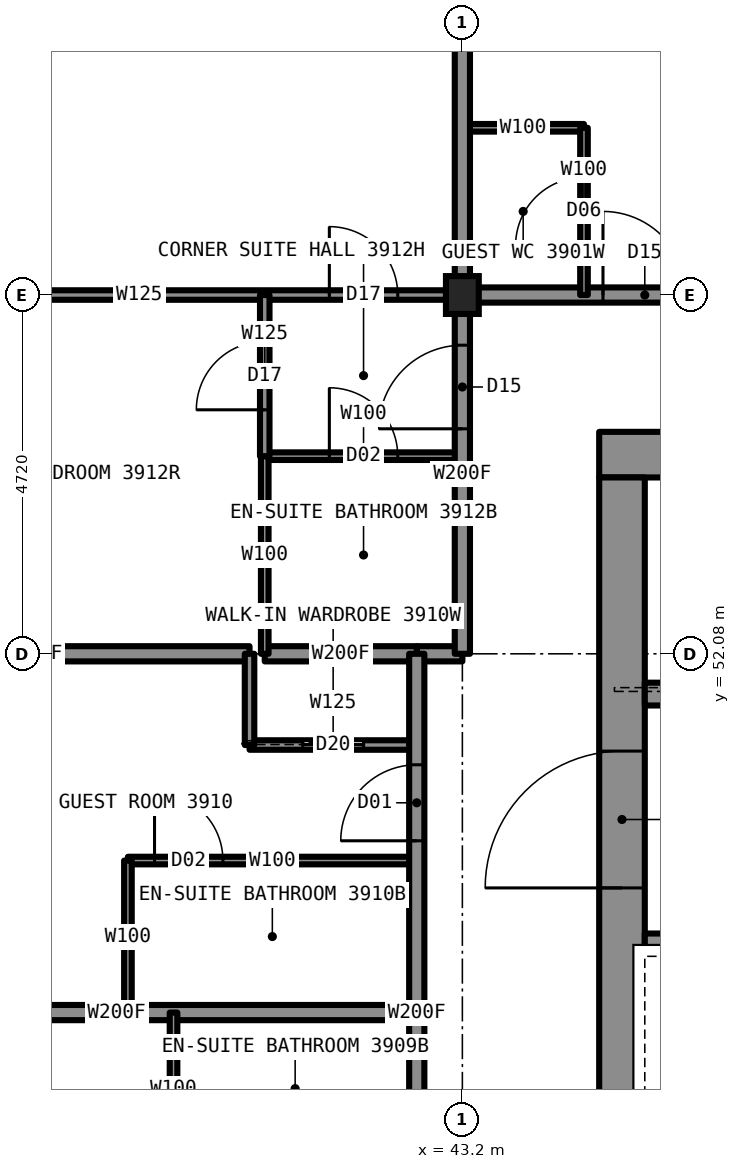
"""IFC4 building model, lengths in metres.
Left out: names, types, materials, properties, quantities, classifications, styles, units other than length and angle.
Written with IfcOpenShell. Run it as: python <this file> out.ifc"""

import sys

from ifc_helpers import new_model, si_unit, direction, frame, frame_2d, origin, origin_2d, place, context, subcontext, project, spatial, rectangle, i_section, extrude, element, fill, save


model = new_model("IFC4")
c1 = context("Model", 3, precision=1e-05, world=origin(), true_north=direction((0.0, 1.0)))
c2 = subcontext(c1, "Body", "Model", "MODEL_VIEW")
j1 = project(units=[si_unit("LENGTHUNIT", "METRE"), si_unit("PLANEANGLEUNIT", "RADIAN")], contexts=[c1])
p1 = place(None, origin())
s1 = spatial("IfcSite", under=j1, at=p1, CompositionType="ELEMENT")
p2 = place(p1, origin())
s2 = spatial("IfcBuilding", under=s1, at=p2, CompositionType="ELEMENT")
p3 = place(p2, frame((0.0, 0.0, 145.9)))
s3 = spatial("IfcBuildingStorey", under=s2, at=p3, CompositionType="ELEMENT", Elevation=145.9)
p4 = place(p3, frame((43.2, 56.8, 0.0), z_axis=(0.0, 0.0, 1.0), x_axis=(1.0, 0.0, 0.0)))
e1 = element("IfcColumn", 1, at=p4, inside=s3, PredefinedType="COLUMN", context=c2, shape_type="SweptSolid", body=[
    extrude(i_section(OverallWidth=0.432, OverallDepth=0.498, WebThickness=0.056, FlangeThickness=0.089, at=origin_2d()), origin(), (0.0, 0.0, 1.0), 3.5),
])
p5 = place(p3, frame((45.0, 54.7, 0.0), z_axis=(0.0, 0.0, 1.0), x_axis=(1.0, 0.0, 0.0)))
e2 = element("IfcWall", 2, at=p5, inside=s3, PredefinedType="SHEAR", context=c2, shape_type="SweptSolid", body=[
    extrude(rectangle(XDim=20.0, YDim=0.6, at=frame_2d((10.0, 0.0))), origin(), (0.0, 0.0, 1.0), 3.5),
])
p6 = place(p3, frame((45.3, 35.6, 0.0), z_axis=(0.0, 0.0, 1.0), x_axis=(0.0, 1.0, 0.0)))
e3 = element("IfcWall", 3, at=p6, inside=s3, PredefinedType="SHEAR", context=c2, shape_type="SweptSolid", body=[
    extrude(rectangle(XDim=18.8, YDim=0.6, at=frame_2d((9.4, 0.0))), origin(), (0.0, 0.0, 1.0), 3.5),
])
p7 = place(p6, frame((13.4, 0.0, 0.0)))
e4 = element("IfcOpeningElement", 4, at=p7, cuts=e3, PredefinedType="OPENING", context=c2, shape_type="SweptSolid", body=[
    extrude(rectangle(XDim=1.8, YDim=2.2, at=frame_2d((0.9, 1.1))), frame((0.0, 0.31, 0.0), z_axis=(0.0, -1.0, 0.0), x_axis=(1.0, 0.0, 0.0)), (0.0, 0.0, 1.0), 0.62),
])
p8 = place(p6, frame((3.6, 0.0, 0.0)))
e5 = element("IfcOpeningElement", 5, at=p8, cuts=e3, PredefinedType="OPENING", context=c2, shape_type="SweptSolid", body=[
    extrude(rectangle(XDim=1.8, YDim=2.2, at=frame_2d((0.9, 1.1))), frame((0.0, 0.31, 0.0), z_axis=(0.0, -1.0, 0.0), x_axis=(1.0, 0.0, 0.0)), (0.0, 0.0, 1.0), 0.62),
])
p9 = place(p6, frame((6.4, 0.0, 0.0)))
e6 = element("IfcOpeningElement", 6, at=p9, cuts=e3, PredefinedType="OPENING", context=c2, shape_type="SweptSolid", body=[
    extrude(rectangle(XDim=1.2, YDim=2.2, at=frame_2d((0.6, 1.1))), frame((0.0, 0.31, 0.0), z_axis=(0.0, -1.0, 0.0), x_axis=(1.0, 0.0, 0.0)), (0.0, 0.0, 1.0), 0.62),
])
p10 = place(p3, frame((45.6, 51.55, 0.0), z_axis=(0.0, 0.0, 1.0), x_axis=(1.0, 0.0, 0.0)))
e7 = element("IfcWall", 7, at=p10, inside=s3, PredefinedType="SHEAR", context=c2, shape_type="SweptSolid", body=[
    extrude(rectangle(XDim=18.8, YDim=0.3, at=frame_2d((9.4, 0.0))), origin(), (0.0, 0.0, 1.0), 3.5),
])
p11 = place(p10, frame((0.7, 0.0, 0.0)))
e8 = element("IfcOpeningElement", 8, at=p11, cuts=e7, PredefinedType="OPENING", context=c2, shape_type="SweptSolid", body=[
    extrude(rectangle(XDim=1.1, YDim=2.2, at=frame_2d((0.55, 1.1))), frame((0.0, 0.16, 0.0), z_axis=(0.0, -1.0, 0.0), x_axis=(1.0, 0.0, 0.0)), (0.0, 0.0, 1.0), 0.32),
])
p12 = place(p10, frame((3.4, 0.0, 0.0)))
e9 = element("IfcOpeningElement", 9, at=p12, cuts=e7, PredefinedType="OPENING", context=c2, shape_type="SweptSolid", body=[
    extrude(rectangle(XDim=1.1, YDim=2.2, at=frame_2d((0.55, 1.1))), frame((0.0, 0.16, 0.0), z_axis=(0.0, -1.0, 0.0), x_axis=(1.0, 0.0, 0.0)), (0.0, 0.0, 1.0), 0.32),
])
p13 = place(p10, frame((6.1, 0.0, 0.0)))
e10 = element("IfcOpeningElement", 10, at=p13, cuts=e7, PredefinedType="OPENING", context=c2, shape_type="SweptSolid", body=[
    extrude(rectangle(XDim=1.1, YDim=2.2, at=frame_2d((0.55, 1.1))), frame((0.0, 0.16, 0.0), z_axis=(0.0, -1.0, 0.0), x_axis=(1.0, 0.0, 0.0)), (0.0, 0.0, 1.0), 0.32),
])
p14 = place(p10, frame((8.8, 0.0, 0.0)))
e11 = element("IfcOpeningElement", 11, at=p14, cuts=e7, PredefinedType="OPENING", context=c2, shape_type="SweptSolid", body=[
    extrude(rectangle(XDim=1.1, YDim=2.2, at=frame_2d((0.55, 1.1))), frame((0.0, 0.16, 0.0), z_axis=(0.0, -1.0, 0.0), x_axis=(1.0, 0.0, 0.0)), (0.0, 0.0, 1.0), 0.32),
])
p15 = place(p10, frame((11.6, 0.0, 0.0)))
e12 = element("IfcOpeningElement", 12, at=p15, cuts=e7, PredefinedType="OPENING", context=c2, shape_type="SweptSolid", body=[
    extrude(rectangle(XDim=1.1, YDim=2.2, at=frame_2d((0.55, 1.1))), frame((0.0, 0.16, 0.0), z_axis=(0.0, -1.0, 0.0), x_axis=(1.0, 0.0, 0.0)), (0.0, 0.0, 1.0), 0.32),
])
p16 = place(p10, frame((14.3, 0.0, 0.0)))
e13 = element("IfcOpeningElement", 13, at=p16, cuts=e7, PredefinedType="OPENING", context=c2, shape_type="SweptSolid", body=[
    extrude(rectangle(XDim=1.1, YDim=2.2, at=frame_2d((0.55, 1.1))), frame((0.0, 0.16, 0.0), z_axis=(0.0, -1.0, 0.0), x_axis=(1.0, 0.0, 0.0)), (0.0, 0.0, 1.0), 0.32),
])
p17 = place(p3, frame((45.6, 48.25, 0.0), z_axis=(0.0, 0.0, 1.0), x_axis=(1.0, 0.0, 0.0)))
e14 = element("IfcWall", 14, at=p17, inside=s3, PredefinedType="SHEAR", context=c2, shape_type="SweptSolid", body=[
    extrude(rectangle(XDim=7.1, YDim=0.3, at=frame_2d((3.55, 0.0))), origin(), (0.0, 0.0, 1.0), 3.5),
])
p18 = place(p3, frame((43.2, 56.8, 0.0), z_axis=(0.0, 0.0, 1.0), x_axis=(1.0, 0.0, 0.0)))
e15 = element("IfcWall", 15, at=p18, inside=s3, PredefinedType="PARTITIONING", context=c2, shape_type="SweptSolid", body=[
    extrude(rectangle(XDim=23.6, YDim=0.2, at=frame_2d((11.8, 0.0))), origin(), (0.0, 0.0, 1.0), 3.33),
])
p19 = place(p18, frame((1.85, 0.0, 0.0)))
e16 = element("IfcOpeningElement", 16, at=p19, cuts=e15, PredefinedType="OPENING", context=c2, shape_type="SweptSolid", body=[
    extrude(rectangle(XDim=1.1, YDim=2.2, at=frame_2d((0.55, 1.1))), frame((0.0, 0.11, 0.0), z_axis=(0.0, -1.0, 0.0), x_axis=(1.0, 0.0, 0.0)), (0.0, 0.0, 1.0), 0.22),
])
p20 = place(p18, frame((17.16, 0.0, 0.0)))
e17 = element("IfcOpeningElement", 17, at=p20, cuts=e15, PredefinedType="OPENING", context=c2, shape_type="SweptSolid", body=[
    extrude(rectangle(XDim=1.0, YDim=2.2, at=frame_2d((0.5, 1.1))), frame((0.0, 0.11, 0.0), z_axis=(0.0, -1.0, 0.0), x_axis=(1.0, 0.0, 0.0)), (0.0, 0.0, 1.0), 0.22),
])
p21 = place(p3, frame((34.7, 56.8, 0.0), z_axis=(0.0, 0.0, 1.0), x_axis=(1.0, 0.0, 0.0)))
e18 = element("IfcWall", 18, at=p21, inside=s3, PredefinedType="PARTITIONING", context=c2, shape_type="SweptSolid", body=[
    extrude(rectangle(XDim=8.5, YDim=0.125, at=frame_2d((4.25, 0.0))), origin(), (0.0, 0.0, 1.0), 2.573),
])
p22 = place(p21, frame((6.75, 0.0, 0.0)))
e19 = element("IfcOpeningElement", 19, at=p22, cuts=e18, PredefinedType="OPENING", context=c2, shape_type="SweptSolid", body=[
    extrude(rectangle(XDim=0.9, YDim=2.2, at=frame_2d((0.45, 1.1))), frame((0.0, 0.073, 0.0), z_axis=(0.0, -1.0, 0.0), x_axis=(1.0, 0.0, 0.0)), (0.0, 0.0, 1.0), 0.145),
])
p23 = place(p3, frame((43.2, 59.0, 0.0), z_axis=(0.0, 0.0, 1.0), x_axis=(1.0, 0.0, 0.0)))
e20 = element("IfcWall", 20, at=p23, inside=s3, PredefinedType="PARTITIONING", context=c2, shape_type="SweptSolid", body=[
    extrude(rectangle(XDim=1.6, YDim=0.1, at=frame_2d((0.8, 0.0))), origin(), (0.0, 0.0, 1.0), 3.33),
])
p24 = place(p3, frame((34.7, 47.36, 0.0), z_axis=(0.0, 0.0, 1.0), x_axis=(1.0, 0.0, 0.0)))
e21 = element("IfcWall", 21, at=p24, inside=s3, PredefinedType="PARTITIONING", context=c2, shape_type="SweptSolid", body=[
    extrude(rectangle(XDim=7.9, YDim=0.2, at=frame_2d((3.95, 0.0))), origin(), (0.0, 0.0, 1.0), 2.731),
])
p25 = place(p3, frame((38.8, 49.36, 0.0), z_axis=(0.0, 0.0, 1.0), x_axis=(1.0, 0.0, 0.0)))
e22 = element("IfcWall", 22, at=p25, inside=s3, PredefinedType="PARTITIONING", context=c2, shape_type="SweptSolid", body=[
    extrude(rectangle(XDim=3.8, YDim=0.1, at=frame_2d((1.9, 0.0))), origin(), (0.0, 0.0, 1.0), 3.33),
])
p26 = place(p25, frame((0.35, 0.0, 0.0)))
e23 = element("IfcOpeningElement", 23, at=p26, cuts=e22, PredefinedType="OPENING", context=c2, shape_type="SweptSolid", body=[
    extrude(rectangle(XDim=0.9, YDim=2.1, at=frame_2d((0.45, 1.05))), frame((0.0, 0.06, 0.0), z_axis=(0.0, -1.0, 0.0), x_axis=(1.0, 0.0, 0.0)), (0.0, 0.0, 1.0), 0.12),
])
p27 = place(p3, frame((40.4, 50.88, 0.0), z_axis=(0.0, 0.0, 1.0), x_axis=(1.0, 0.0, 0.0)))
e24 = element("IfcWall", 24, at=p27, inside=s3, PredefinedType="PARTITIONING", context=c2, shape_type="SweptSolid", body=[
    extrude(rectangle(XDim=2.2, YDim=0.125, at=frame_2d((1.1, 0.0))), origin(), (0.0, 0.0, 1.0), 3.33),
])
p28 = place(p27, frame((0.7, 0.0, 0.0)))
e25 = element("IfcOpeningElement", 25, at=p28, cuts=e24, PredefinedType="OPENING", context=c2, shape_type="SweptSolid", body=[
    extrude(rectangle(XDim=0.8, YDim=2.1, at=frame_2d((0.4, 1.05))), frame((0.0, 0.073, 0.0), z_axis=(0.0, -1.0, 0.0), x_axis=(1.0, 0.0, 0.0)), (0.0, 0.0, 1.0), 0.145),
])
p29 = place(p3, frame((42.6, 52.08, 0.0), z_axis=(0.0, 0.0, 1.0), x_axis=(1.0, 0.0, 0.0)))
e26 = element("IfcWall", 26, at=p29, inside=s3, PredefinedType="PARTITIONING", context=c2, shape_type="SweptSolid", body=[
    extrude(rectangle(XDim=0.6, YDim=0.2, at=frame_2d((0.3, 0.0))), origin(), (0.0, 0.0, 1.0), 2.573),
])
p30 = place(p3, frame((34.7, 52.08, 0.0), z_axis=(0.0, 0.0, 1.0), x_axis=(1.0, 0.0, 0.0)))
e27 = element("IfcWall", 27, at=p30, inside=s3, PredefinedType="PARTITIONING", context=c2, shape_type="SweptSolid", body=[
    extrude(rectangle(XDim=5.7, YDim=0.2, at=frame_2d((2.85, 0.0))), origin(), (0.0, 0.0, 1.0), 2.573),
])
p31 = place(p3, frame((40.6, 52.08, 0.0), z_axis=(0.0, 0.0, 1.0), x_axis=(1.0, 0.0, 0.0)))
e28 = element("IfcWall", 28, at=p31, inside=s3, PredefinedType="PARTITIONING", context=c2, shape_type="SweptSolid", body=[
    extrude(rectangle(XDim=2.0, YDim=0.2, at=frame_2d((1.0, 0.0))), origin(), (0.0, 0.0, 1.0), 2.573),
])
p32 = place(p3, frame((40.6, 54.68, 0.0), z_axis=(0.0, 0.0, 1.0), x_axis=(1.0, 0.0, 0.0)))
e29 = element("IfcWall", 29, at=p32, inside=s3, PredefinedType="PARTITIONING", context=c2, shape_type="SweptSolid", body=[
    extrude(rectangle(XDim=2.6, YDim=0.1, at=frame_2d((1.3, 0.0))), origin(), (0.0, 0.0, 1.0), 3.33),
])
p33 = place(p32, frame((0.85, 0.0, 0.0)))
e30 = element("IfcOpeningElement", 30, at=p33, cuts=e29, PredefinedType="OPENING", context=c2, shape_type="SweptSolid", body=[
    extrude(rectangle(XDim=0.9, YDim=2.1, at=frame_2d((0.45, 1.05))), frame((0.0, 0.06, 0.0), z_axis=(0.0, -1.0, 0.0), x_axis=(1.0, 0.0, 0.0)), (0.0, 0.0, 1.0), 0.12),
])
p34 = place(p3, frame((44.8, 56.8, 0.0), z_axis=(0.0, 0.0, 1.0), x_axis=(0.0, 1.0, 0.0)))
e31 = element("IfcWall", 31, at=p34, inside=s3, PredefinedType="PARTITIONING", context=c2, shape_type="SweptSolid", body=[
    extrude(rectangle(XDim=2.2, YDim=0.1, at=frame_2d((1.1, 0.0))), origin(), (0.0, 0.0, 1.0), 3.33),
])
p35 = place(p34, frame((0.65, 0.0, 0.0)))
e32 = element("IfcOpeningElement", 32, at=p35, cuts=e31, PredefinedType="OPENING", context=c2, shape_type="SweptSolid", body=[
    extrude(rectangle(XDim=0.9, YDim=2.1, at=frame_2d((0.45, 1.05))), frame((0.0, 0.06, 0.0), z_axis=(0.0, -1.0, 0.0), x_axis=(1.0, 0.0, 0.0)), (0.0, 0.0, 1.0), 0.12),
])
p36 = place(p3, frame((43.2, 52.08, 0.0), z_axis=(0.0, 0.0, 1.0), x_axis=(0.0, 1.0, 0.0)))
e33 = element("IfcWall", 33, at=p36, inside=s3, PredefinedType="PARTITIONING", context=c2, shape_type="SweptSolid", body=[
    extrude(rectangle(XDim=4.72, YDim=0.2, at=frame_2d((2.36, 0.0))), origin(), (0.0, 0.0, 1.0), 3.33),
])
p37 = place(p36, frame((2.96, 0.0, 0.0)))
e34 = element("IfcOpeningElement", 34, at=p37, cuts=e33, PredefinedType="OPENING", context=c2, shape_type="SweptSolid", body=[
    extrude(rectangle(XDim=1.1, YDim=2.2, at=frame_2d((0.55, 1.1))), frame((0.0, 0.11, 0.0), z_axis=(0.0, -1.0, 0.0), x_axis=(1.0, 0.0, 0.0)), (0.0, 0.0, 1.0), 0.22),
])
p38 = place(p3, frame((43.2, 56.8, 0.0), z_axis=(0.0, 0.0, 1.0), x_axis=(0.0, 1.0, 0.0)))
e35 = element("IfcWall", 35, at=p38, inside=s3, PredefinedType="PARTITIONING", context=c2, shape_type="SweptSolid", body=[
    extrude(rectangle(XDim=8.5, YDim=0.2, at=frame_2d((4.25, 0.0))), origin(), (0.0, 0.0, 1.0), 2.573),
])
p39 = place(p3, frame((42.6, 37.92, 0.0), z_axis=(0.0, 0.0, 1.0), x_axis=(0.0, 1.0, 0.0)))
e36 = element("IfcWall", 36, at=p39, inside=s3, PredefinedType="PARTITIONING", context=c2, shape_type="SweptSolid", body=[
    extrude(rectangle(XDim=14.16, YDim=0.2, at=frame_2d((7.08, 0.0))), origin(), (0.0, 0.0, 1.0), 3.33),
])
p40 = place(p39, frame((1.46, 0.0, 0.0)))
e37 = element("IfcOpeningElement", 37, at=p40, cuts=e36, PredefinedType="OPENING", context=c2, shape_type="SweptSolid", body=[
    extrude(rectangle(XDim=1.0, YDim=2.2, at=frame_2d((0.5, 1.1))), frame((0.0, 0.11, 0.0), z_axis=(0.0, -1.0, 0.0), x_axis=(1.0, 0.0, 0.0)), (0.0, 0.0, 1.0), 0.22),
])
p41 = place(p39, frame((6.18, 0.0, 0.0)))
e38 = element("IfcOpeningElement", 38, at=p41, cuts=e36, PredefinedType="OPENING", context=c2, shape_type="SweptSolid", body=[
    extrude(rectangle(XDim=1.0, YDim=2.2, at=frame_2d((0.5, 1.1))), frame((0.0, 0.11, 0.0), z_axis=(0.0, -1.0, 0.0), x_axis=(1.0, 0.0, 0.0)), (0.0, 0.0, 1.0), 0.22),
])
p42 = place(p39, frame((11.7, 0.0, 0.0)))
e39 = element("IfcOpeningElement", 39, at=p42, cuts=e36, PredefinedType="OPENING", context=c2, shape_type="SweptSolid", body=[
    extrude(rectangle(XDim=1.0, YDim=2.2, at=frame_2d((0.5, 1.1))), frame((0.0, 0.11, 0.0), z_axis=(0.0, -1.0, 0.0), x_axis=(1.0, 0.0, 0.0)), (0.0, 0.0, 1.0), 0.22),
])
p43 = place(p3, frame((40.6, 52.08, 0.0), z_axis=(0.0, 0.0, 1.0), x_axis=(0.0, 1.0, 0.0)))
e40 = element("IfcWall", 40, at=p43, inside=s3, PredefinedType="PARTITIONING", context=c2, shape_type="SweptSolid", body=[
    extrude(rectangle(XDim=2.6, YDim=0.1, at=frame_2d((1.3, 0.0))), origin(), (0.0, 0.0, 1.0), 3.33),
])
p44 = place(p3, frame((40.6, 54.68, 0.0), z_axis=(0.0, 0.0, 1.0), x_axis=(0.0, 1.0, 0.0)))
e41 = element("IfcWall", 41, at=p44, inside=s3, PredefinedType="PARTITIONING", context=c2, shape_type="SweptSolid", body=[
    extrude(rectangle(XDim=2.12, YDim=0.125, at=frame_2d((1.06, 0.0))), origin(), (0.0, 0.0, 1.0), 3.33),
])
p45 = place(p44, frame((0.61, 0.0, 0.0)))
e42 = element("IfcOpeningElement", 42, at=p45, cuts=e41, PredefinedType="OPENING", context=c2, shape_type="SweptSolid", body=[
    extrude(rectangle(XDim=0.9, YDim=2.2, at=frame_2d((0.45, 1.1))), frame((0.0, 0.073, 0.0), z_axis=(0.0, -1.0, 0.0), x_axis=(1.0, 0.0, 0.0)), (0.0, 0.0, 1.0), 0.145),
])
p46 = place(p3, frame((40.4, 50.88, 0.0), z_axis=(0.0, 0.0, 1.0), x_axis=(0.0, 1.0, 0.0)))
e43 = element("IfcWall", 43, at=p46, inside=s3, PredefinedType="PARTITIONING", context=c2, shape_type="SweptSolid", body=[
    extrude(rectangle(XDim=1.2, YDim=0.125, at=frame_2d((0.6, 0.0))), origin(), (0.0, 0.0, 1.0), 3.33),
])
for number, where, z_axis, x_axis in (
    (44, (39.4, 45.36, 0.0), (0.0, 0.0, 1.0), (0.0, 1.0, 0.0)),
    (45, (38.8, 47.36, 0.0), (0.0, 0.0, 1.0), (0.0, 1.0, 0.0)),
):
    element("IfcWall", number, at=place(p3, frame(where, z_axis=z_axis, x_axis=x_axis)), inside=s3, PredefinedType="PARTITIONING", context=c2, shape_type="SweptSolid", body=[
        extrude(rectangle(XDim=2.0, YDim=0.1, at=frame_2d((1.0, 0.0))), origin(), (0.0, 0.0, 1.0), 3.33),
    ])
p47 = place(p19, origin())
e46 = element("IfcDoor", 46, at=p47, inside=s3, OperationType="SINGLE_SWING_LEFT", PredefinedType="DOOR", context=c2, shape_type="SweptSolid", body=[
    extrude(rectangle(XDim=1.1, YDim=2.2, at=frame_2d((0.55, 1.1))), frame((0.0, 0.025, 0.0), z_axis=(0.0, -1.0, 0.0), x_axis=(1.0, 0.0, 0.0)), (0.0, 0.0, 1.0), 0.05),
])
fill(e16, e46)
p48 = place(p35, origin())
e47 = element("IfcDoor", 47, at=p48, inside=s3, OperationType="SINGLE_SWING_LEFT", PredefinedType="DOOR", context=c2, shape_type="SweptSolid", body=[
    extrude(rectangle(XDim=0.9, YDim=2.1, at=frame_2d((0.45, 1.05))), frame((0.0, 0.025, 0.0), z_axis=(0.0, -1.0, 0.0), x_axis=(1.0, 0.0, 0.0)), (0.0, 0.0, 1.0), 0.05),
])
fill(e32, e47)
p49 = place(p42, origin())
e48 = element("IfcDoor", 48, at=p49, inside=s3, OperationType="SINGLE_SWING_LEFT", PredefinedType="DOOR", context=c2, shape_type="SweptSolid", body=[
    extrude(rectangle(XDim=1.0, YDim=2.2, at=frame_2d((0.5, 1.1))), frame((0.0, 0.025, 0.0), z_axis=(0.0, -1.0, 0.0), x_axis=(1.0, 0.0, 0.0)), (0.0, 0.0, 1.0), 0.05),
])
fill(e39, e48)
p50 = place(p26, origin())
e49 = element("IfcDoor", 49, at=p50, inside=s3, OperationType="SINGLE_SWING_RIGHT", PredefinedType="DOOR", context=c2, shape_type="SweptSolid", body=[
    extrude(rectangle(XDim=0.9, YDim=2.1, at=frame_2d((0.45, 1.05))), frame((0.0, 0.025, 0.0), z_axis=(0.0, -1.0, 0.0), x_axis=(1.0, 0.0, 0.0)), (0.0, 0.0, 1.0), 0.05),
])
fill(e23, e49)
p51 = place(p28, origin())
e50 = element("IfcDoor", 50, at=p51, inside=s3, OperationType="SLIDING_TO_LEFT", PredefinedType="DOOR", context=c2, shape_type="SweptSolid", body=[
    extrude(rectangle(XDim=0.8, YDim=2.1, at=frame_2d((0.4, 1.05))), frame((0.0, 0.025, 0.0), z_axis=(0.0, -1.0, 0.0), x_axis=(1.0, 0.0, 0.0)), (0.0, 0.0, 1.0), 0.05),
])
fill(e25, e50)
p52 = place(p22, origin())
e51 = element("IfcDoor", 51, at=p52, inside=s3, OperationType="SINGLE_SWING_LEFT", PredefinedType="DOOR", context=c2, shape_type="SweptSolid", body=[
    extrude(rectangle(XDim=0.9, YDim=2.2, at=frame_2d((0.45, 1.1))), frame((0.0, 0.025, 0.0), z_axis=(0.0, -1.0, 0.0), x_axis=(1.0, 0.0, 0.0)), (0.0, 0.0, 1.0), 0.05),
])
fill(e19, e51)
p53 = place(p33, origin())
e52 = element("IfcDoor", 52, at=p53, inside=s3, OperationType="SINGLE_SWING_RIGHT", PredefinedType="DOOR", context=c2, shape_type="SweptSolid", body=[
    extrude(rectangle(XDim=0.9, YDim=2.1, at=frame_2d((0.45, 1.05))), frame((0.0, 0.025, 0.0), z_axis=(0.0, -1.0, 0.0), x_axis=(1.0, 0.0, 0.0)), (0.0, 0.0, 1.0), 0.05),
])
fill(e30, e52)
p54 = place(p37, origin())
e53 = element("IfcDoor", 53, at=p54, inside=s3, OperationType="SINGLE_SWING_LEFT", PredefinedType="DOOR", context=c2, shape_type="SweptSolid", body=[
    extrude(rectangle(XDim=1.1, YDim=2.2, at=frame_2d((0.55, 1.1))), frame((0.0, 0.025, 0.0), z_axis=(0.0, -1.0, 0.0), x_axis=(1.0, 0.0, 0.0)), (0.0, 0.0, 1.0), 0.05),
])
fill(e34, e53)
p55 = place(p45, origin())
e54 = element("IfcDoor", 54, at=p55, inside=s3, OperationType="SINGLE_SWING_LEFT", PredefinedType="DOOR", context=c2, shape_type="SweptSolid", body=[
    extrude(rectangle(XDim=0.9, YDim=2.2, at=frame_2d((0.45, 1.1))), frame((0.0, 0.025, 0.0), z_axis=(0.0, -1.0, 0.0), x_axis=(1.0, 0.0, 0.0)), (0.0, 0.0, 1.0), 0.05),
])
fill(e42, e54)
p56 = place(p7, origin())
e55 = element("IfcDoor", 55, at=p56, inside=s3, OperationType="DOUBLE_DOOR_SINGLE_SWING", PredefinedType="DOOR", context=c2, shape_type="SweptSolid", body=[
    extrude(rectangle(XDim=1.8, YDim=2.2, at=frame_2d((0.9, 1.1))), frame((0.0, 0.025, 0.0), z_axis=(0.0, -1.0, 0.0), x_axis=(1.0, 0.0, 0.0)), (0.0, 0.0, 1.0), 0.05),
])
fill(e4, e55)
save(model, sys.argv[1])
